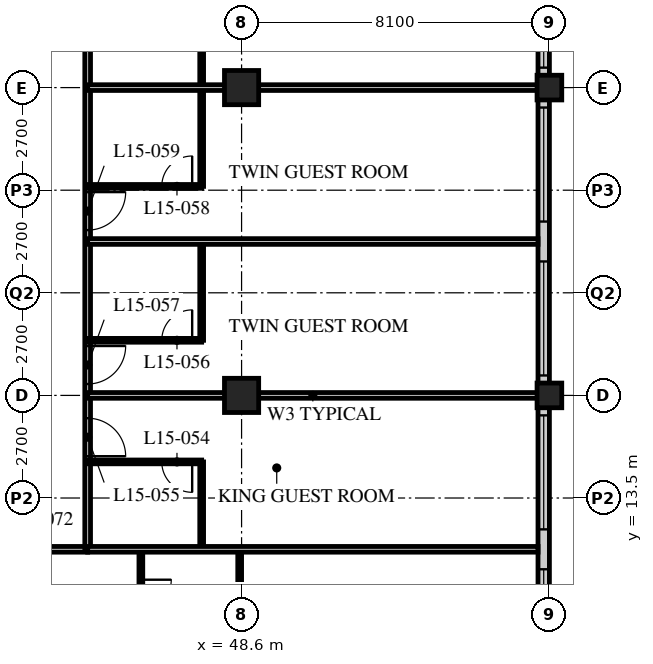
"""IFC4 building model, lengths in metres.
Left out: names, types, materials, properties, quantities, classifications, styles, units other than length and angle.
Written with IfcOpenShell. Run it as: python <this file> out.ifc"""

import sys

from ifc_helpers import new_model, si_unit, direction, frame, frame_2d, origin, origin_2d, place, context, subcontext, project, spatial, rectangle, hollow_rectangle, extrude, element, fill, save


model = new_model("IFC4")
c1 = context("Model", 3, precision=1e-05, world=origin(), true_north=direction((0.0, 1.0)))
c2 = subcontext(c1, "Body", "Model", "MODEL_VIEW")
j1 = project(units=[si_unit("LENGTHUNIT", "METRE"), si_unit("PLANEANGLEUNIT", "RADIAN")], contexts=[c1])
p1 = place(None, origin())
s1 = spatial("IfcSite", under=j1, at=p1, CompositionType="ELEMENT")
p2 = place(p1, origin())
s2 = spatial("IfcBuilding", under=s1, at=p2, CompositionType="ELEMENT")
p3 = place(p2, frame((0.0, 0.0, 63.6)))
s3 = spatial("IfcBuildingStorey", under=s2, at=p3, CompositionType="ELEMENT", Elevation=63.6)
for number, where, z_axis, x_axis in (
    (1, (48.6, 16.2, 0.0), (0.0, 0.0, 1.0), (1.0, 0.0, 0.0)),
    (2, (48.6, 24.3, 0.0), (0.0, 0.0, 1.0), (1.0, 0.0, 0.0)),
):
    element("IfcColumn", number, at=place(p3, frame(where, z_axis=z_axis, x_axis=x_axis)), inside=s3, PredefinedType="COLUMN", context=c2, shape_type="SweptSolid", body=[
        extrude(hollow_rectangle(XDim=0.9, YDim=0.9, WallThickness=0.09, at=origin_2d()), origin(), (0.0, 0.0, 1.0), 3.4),
    ])
for number, where, z_axis, x_axis in (
    (3, (56.7, 16.2, 0.0), (0.0, 0.0, 1.0), (1.0, 0.0, 0.0)),
    (4, (56.7, 24.3, 0.0), (0.0, 0.0, 1.0), (1.0, 0.0, 0.0)),
):
    element("IfcColumn", number, at=place(p3, frame(where, z_axis=z_axis, x_axis=x_axis)), inside=s3, PredefinedType="COLUMN", context=c2, shape_type="SweptSolid", body=[
        extrude(hollow_rectangle(XDim=0.65, YDim=0.65, WallThickness=0.05, at=origin_2d()), origin(), (0.0, 0.0, 1.0), 3.4),
    ])
p4 = place(p3, frame((56.55, 8.4, 0.0), z_axis=(0.0, 0.0, 1.0), x_axis=(0.0, 1.0, 0.0)))
e5 = element("IfcWall", 5, at=p4, inside=s3, PredefinedType="SOLIDWALL", context=c2, shape_type="SweptSolid", body=[
    extrude(rectangle(XDim=32.1, YDim=0.3, at=frame_2d((16.05, 0.0))), origin(), (0.0, 0.0, 1.0), 3.19),
])
p5 = place(p4, frame((0.225, 0.0, 0.9)))
e6 = element("IfcOpeningElement", 6, at=p5, cuts=e5, PredefinedType="OPENING", context=c2, shape_type="SweptSolid", body=[
    extrude(rectangle(XDim=3.0, YDim=2.0, at=frame_2d((1.5, 1.0))), frame((0.0, 0.16, 0.0), z_axis=(0.0, -1.0, 0.0), x_axis=(1.0, 0.0, 0.0)), (0.0, 0.0, 1.0), 0.32),
])
p6 = place(p4, frame((4.275, 0.0, 0.9)))
e7 = element("IfcOpeningElement", 7, at=p6, cuts=e5, PredefinedType="OPENING", context=c2, shape_type="SweptSolid", body=[
    extrude(rectangle(XDim=3.0, YDim=2.0, at=frame_2d((1.5, 1.0))), frame((0.0, 0.16, 0.0), z_axis=(0.0, -1.0, 0.0), x_axis=(1.0, 0.0, 0.0)), (0.0, 0.0, 1.0), 0.32),
])
p7 = place(p4, frame((8.325, 0.0, 0.9)))
e8 = element("IfcOpeningElement", 8, at=p7, cuts=e5, PredefinedType="OPENING", context=c2, shape_type="SweptSolid", body=[
    extrude(rectangle(XDim=3.0, YDim=2.0, at=frame_2d((1.5, 1.0))), frame((0.0, 0.16, 0.0), z_axis=(0.0, -1.0, 0.0), x_axis=(1.0, 0.0, 0.0)), (0.0, 0.0, 1.0), 0.32),
])
p8 = place(p4, frame((12.375, 0.0, 0.9)))
e9 = element("IfcOpeningElement", 9, at=p8, cuts=e5, PredefinedType="OPENING", context=c2, shape_type="SweptSolid", body=[
    extrude(rectangle(XDim=3.0, YDim=2.0, at=frame_2d((1.5, 1.0))), frame((0.0, 0.16, 0.0), z_axis=(0.0, -1.0, 0.0), x_axis=(1.0, 0.0, 0.0)), (0.0, 0.0, 1.0), 0.32),
])
p9 = place(p4, frame((16.425, 0.0, 0.9)))
e10 = element("IfcOpeningElement", 10, at=p9, cuts=e5, PredefinedType="OPENING", context=c2, shape_type="SweptSolid", body=[
    extrude(rectangle(XDim=3.0, YDim=2.0, at=frame_2d((1.5, 1.0))), frame((0.0, 0.16, 0.0), z_axis=(0.0, -1.0, 0.0), x_axis=(1.0, 0.0, 0.0)), (0.0, 0.0, 1.0), 0.32),
])
p10 = place(p4, frame((20.475, 0.0, 0.9)))
e11 = element("IfcOpeningElement", 11, at=p10, cuts=e5, PredefinedType="OPENING", context=c2, shape_type="SweptSolid", body=[
    extrude(rectangle(XDim=3.0, YDim=2.0, at=frame_2d((1.5, 1.0))), frame((0.0, 0.16, 0.0), z_axis=(0.0, -1.0, 0.0), x_axis=(1.0, 0.0, 0.0)), (0.0, 0.0, 1.0), 0.32),
])
p11 = place(p4, frame((24.525, 0.0, 0.9)))
e12 = element("IfcOpeningElement", 12, at=p11, cuts=e5, PredefinedType="OPENING", context=c2, shape_type="SweptSolid", body=[
    extrude(rectangle(XDim=3.0, YDim=2.0, at=frame_2d((1.5, 1.0))), frame((0.0, 0.16, 0.0), z_axis=(0.0, -1.0, 0.0), x_axis=(1.0, 0.0, 0.0)), (0.0, 0.0, 1.0), 0.32),
])
p12 = place(p4, frame((28.575, 0.0, 0.9)))
e13 = element("IfcOpeningElement", 13, at=p12, cuts=e5, PredefinedType="OPENING", context=c2, shape_type="SweptSolid", body=[
    extrude(rectangle(XDim=3.0, YDim=2.0, at=frame_2d((1.5, 1.0))), frame((0.0, 0.16, 0.0), z_axis=(0.0, -1.0, 0.0), x_axis=(1.0, 0.0, 0.0)), (0.0, 0.0, 1.0), 0.32),
])
p13 = place(p3, frame((8.1, 12.15, 0.0), z_axis=(0.0, 0.0, 1.0), x_axis=(1.0, 0.0, 0.0)))
e14 = element("IfcWall", 14, at=p13, inside=s3, PredefinedType="PARTITIONING", context=c2, shape_type="SweptSolid", body=[
    extrude(rectangle(XDim=36.45, YDim=0.15, at=frame_2d((18.225, 0.0))), origin(), (0.0, 0.0, 1.0), 3.19),
])
p14 = place(p13, frame((4.35, 0.0, 0.0)))
e15 = element("IfcOpeningElement", 15, at=p14, cuts=e14, PredefinedType="OPENING", context=c2, shape_type="SweptSolid", body=[
    extrude(rectangle(XDim=1.0, YDim=2.1, at=frame_2d((0.5, 1.05))), frame((0.0, 0.085, 0.0), z_axis=(0.0, -1.0, 0.0), x_axis=(1.0, 0.0, 0.0)), (0.0, 0.0, 1.0), 0.17),
])
p15 = place(p13, frame((10.55, 0.0, 0.0)))
e16 = element("IfcOpeningElement", 16, at=p15, cuts=e14, PredefinedType="OPENING", context=c2, shape_type="SweptSolid", body=[
    extrude(rectangle(XDim=1.0, YDim=2.1, at=frame_2d((0.5, 1.05))), frame((0.0, 0.085, 0.0), z_axis=(0.0, -1.0, 0.0), x_axis=(1.0, 0.0, 0.0)), (0.0, 0.0, 1.0), 0.17),
])
p16 = place(p13, frame((14.6, 0.0, 0.0)))
e17 = element("IfcOpeningElement", 17, at=p16, cuts=e14, PredefinedType="OPENING", context=c2, shape_type="SweptSolid", body=[
    extrude(rectangle(XDim=1.0, YDim=2.1, at=frame_2d((0.5, 1.05))), frame((0.0, 0.085, 0.0), z_axis=(0.0, -1.0, 0.0), x_axis=(1.0, 0.0, 0.0)), (0.0, 0.0, 1.0), 0.17),
])
p17 = place(p13, frame((18.65, 0.0, 0.0)))
e18 = element("IfcOpeningElement", 18, at=p17, cuts=e14, PredefinedType="OPENING", context=c2, shape_type="SweptSolid", body=[
    extrude(rectangle(XDim=1.0, YDim=2.1, at=frame_2d((0.5, 1.05))), frame((0.0, 0.085, 0.0), z_axis=(0.0, -1.0, 0.0), x_axis=(1.0, 0.0, 0.0)), (0.0, 0.0, 1.0), 0.17),
])
p18 = place(p13, frame((22.7, 0.0, 0.0)))
e19 = element("IfcOpeningElement", 19, at=p18, cuts=e14, PredefinedType="OPENING", context=c2, shape_type="SweptSolid", body=[
    extrude(rectangle(XDim=1.0, YDim=2.1, at=frame_2d((0.5, 1.05))), frame((0.0, 0.085, 0.0), z_axis=(0.0, -1.0, 0.0), x_axis=(1.0, 0.0, 0.0)), (0.0, 0.0, 1.0), 0.17),
])
p19 = place(p13, frame((24.6, 0.0, 0.0)))
e20 = element("IfcOpeningElement", 20, at=p19, cuts=e14, PredefinedType="OPENING", context=c2, shape_type="SweptSolid", body=[
    extrude(rectangle(XDim=1.0, YDim=2.1, at=frame_2d((0.5, 1.05))), frame((0.0, 0.085, 0.0), z_axis=(0.0, -1.0, 0.0), x_axis=(1.0, 0.0, 0.0)), (0.0, 0.0, 1.0), 0.17),
])
p20 = place(p13, frame((30.8, 0.0, 0.0)))
e21 = element("IfcOpeningElement", 21, at=p20, cuts=e14, PredefinedType="OPENING", context=c2, shape_type="SweptSolid", body=[
    extrude(rectangle(XDim=1.0, YDim=2.1, at=frame_2d((0.5, 1.05))), frame((0.0, 0.085, 0.0), z_axis=(0.0, -1.0, 0.0), x_axis=(1.0, 0.0, 0.0)), (0.0, 0.0, 1.0), 0.17),
])
p21 = place(p13, frame((1.525, 0.0, 0.0)))
e22 = element("IfcOpeningElement", 22, at=p21, cuts=e14, PredefinedType="OPENING", context=c2, shape_type="SweptSolid", body=[
    extrude(rectangle(XDim=1.0, YDim=2.1, at=frame_2d((0.5, 1.05))), frame((0.0, 0.085, 0.0), z_axis=(0.0, -1.0, 0.0), x_axis=(1.0, 0.0, 0.0)), (0.0, 0.0, 1.0), 0.17),
])
p22 = place(p13, frame((33.925, 0.0, 0.0)))
e23 = element("IfcOpeningElement", 23, at=p22, cuts=e14, PredefinedType="OPENING", context=c2, shape_type="SweptSolid", body=[
    extrude(rectangle(XDim=1.0, YDim=2.1, at=frame_2d((0.5, 1.05))), frame((0.0, 0.085, 0.0), z_axis=(0.0, -1.0, 0.0), x_axis=(1.0, 0.0, 0.0)), (0.0, 0.0, 1.0), 0.17),
])
p23 = place(p3, frame((44.55, 12.15, 0.0), z_axis=(0.0, 0.0, 1.0), x_axis=(0.0, 1.0, 0.0)))
e24 = element("IfcWall", 24, at=p23, inside=s3, PredefinedType="PARTITIONING", context=c2, shape_type="SweptSolid", body=[
    extrude(rectangle(XDim=30.15, YDim=0.15, at=frame_2d((15.075, 0.0))), origin(), (0.0, 0.0, 1.0), 3.19),
])
p24 = place(p23, frame((2.45, 0.0, 0.0)))
e25 = element("IfcOpeningElement", 25, at=p24, cuts=e24, PredefinedType="OPENING", context=c2, shape_type="SweptSolid", body=[
    extrude(rectangle(XDim=1.0, YDim=2.1, at=frame_2d((0.5, 1.05))), frame((0.0, 0.085, 0.0), z_axis=(0.0, -1.0, 0.0), x_axis=(1.0, 0.0, 0.0)), (0.0, 0.0, 1.0), 0.17),
])
p25 = place(p23, frame((4.35, 0.0, 0.0)))
e26 = element("IfcOpeningElement", 26, at=p25, cuts=e24, PredefinedType="OPENING", context=c2, shape_type="SweptSolid", body=[
    extrude(rectangle(XDim=1.0, YDim=2.1, at=frame_2d((0.5, 1.05))), frame((0.0, 0.085, 0.0), z_axis=(0.0, -1.0, 0.0), x_axis=(1.0, 0.0, 0.0)), (0.0, 0.0, 1.0), 0.17),
])
p26 = place(p23, frame((8.4, 0.0, 0.0)))
e27 = element("IfcOpeningElement", 27, at=p26, cuts=e24, PredefinedType="OPENING", context=c2, shape_type="SweptSolid", body=[
    extrude(rectangle(XDim=1.0, YDim=2.1, at=frame_2d((0.5, 1.05))), frame((0.0, 0.085, 0.0), z_axis=(0.0, -1.0, 0.0), x_axis=(1.0, 0.0, 0.0)), (0.0, 0.0, 1.0), 0.17),
])
p27 = place(p23, frame((14.6, 0.0, 0.0)))
e28 = element("IfcOpeningElement", 28, at=p27, cuts=e24, PredefinedType="OPENING", context=c2, shape_type="SweptSolid", body=[
    extrude(rectangle(XDim=1.0, YDim=2.1, at=frame_2d((0.5, 1.05))), frame((0.0, 0.085, 0.0), z_axis=(0.0, -1.0, 0.0), x_axis=(1.0, 0.0, 0.0)), (0.0, 0.0, 1.0), 0.17),
])
p28 = place(p23, frame((21.65, 0.0, 0.0)))
e29 = element("IfcOpeningElement", 29, at=p28, cuts=e24, PredefinedType="OPENING", context=c2, shape_type="SweptSolid", body=[
    extrude(rectangle(XDim=1.0, YDim=2.1, at=frame_2d((0.5, 1.05))), frame((0.0, 0.085, 0.0), z_axis=(0.0, -1.0, 0.0), x_axis=(1.0, 0.0, 0.0)), (0.0, 0.0, 1.0), 0.17),
])
p29 = place(p23, frame((26.7, 0.0, 0.0)))
e30 = element("IfcOpeningElement", 30, at=p29, cuts=e24, PredefinedType="OPENING", context=c2, shape_type="SweptSolid", body=[
    extrude(rectangle(XDim=1.0, YDim=2.1, at=frame_2d((0.5, 1.05))), frame((0.0, 0.085, 0.0), z_axis=(0.0, -1.0, 0.0), x_axis=(1.0, 0.0, 0.0)), (0.0, 0.0, 1.0), 0.17),
])
p30 = place(p3, frame((47.55, 12.15, 0.0), z_axis=(0.0, 0.0, 1.0), x_axis=(0.0, 1.0, 0.0)))
e31 = element("IfcWall", 31, at=p30, inside=s3, PredefinedType="PARTITIONING", context=c2, shape_type="SweptSolid", body=[
    extrude(rectangle(XDim=2.3, YDim=0.1, at=frame_2d((1.15, 0.0))), origin(), (0.0, 0.0, 1.0), 3.19),
])
p31 = place(p3, frame((44.55, 14.45, 0.0), z_axis=(0.0, 0.0, 1.0), x_axis=(1.0, 0.0, 0.0)))
e32 = element("IfcWall", 32, at=p31, inside=s3, PredefinedType="PARTITIONING", context=c2, shape_type="SweptSolid", body=[
    extrude(rectangle(XDim=3.0, YDim=0.1, at=frame_2d((1.5, 0.0))), origin(), (0.0, 0.0, 1.0), 3.19),
])
p32 = place(p31, frame((1.95, 0.0, 0.0)))
e33 = element("IfcOpeningElement", 33, at=p32, cuts=e32, PredefinedType="OPENING", context=c2, shape_type="SweptSolid", body=[
    extrude(rectangle(XDim=0.8, YDim=2.1, at=frame_2d((0.4, 1.05))), frame((0.0, 0.06, 0.0), z_axis=(0.0, -1.0, 0.0), x_axis=(1.0, 0.0, 0.0)), (0.0, 0.0, 1.0), 0.12),
])
p33 = place(p3, frame((44.55, 16.2, 0.0), z_axis=(0.0, 0.0, 1.0), x_axis=(1.0, 0.0, 0.0)))
e34 = element("IfcWall", 34, at=p33, inside=s3, PredefinedType="PARTITIONING", context=c2, shape_type="SweptSolid", body=[
    extrude(rectangle(XDim=11.85, YDim=0.15, at=frame_2d((5.925, 0.0))), origin(), (0.0, 0.0, 1.0), 2.578),
])
p34 = place(p3, frame((47.55, 17.65, 0.0), z_axis=(0.0, 0.0, 1.0), x_axis=(0.0, 1.0, 0.0)))
e35 = element("IfcWall", 35, at=p34, inside=s3, PredefinedType="PARTITIONING", context=c2, shape_type="SweptSolid", body=[
    extrude(rectangle(XDim=2.6, YDim=0.1, at=frame_2d((1.3, 0.0))), origin(), (0.0, 0.0, 1.0), 3.19),
])
p35 = place(p3, frame((44.55, 17.65, 0.0), z_axis=(0.0, 0.0, 1.0), x_axis=(1.0, 0.0, 0.0)))
e36 = element("IfcWall", 36, at=p35, inside=s3, PredefinedType="PARTITIONING", context=c2, shape_type="SweptSolid", body=[
    extrude(rectangle(XDim=3.0, YDim=0.1, at=frame_2d((1.5, 0.0))), origin(), (0.0, 0.0, 1.0), 3.19),
])
p36 = place(p35, frame((1.95, 0.0, 0.0)))
e37 = element("IfcOpeningElement", 37, at=p36, cuts=e36, PredefinedType="OPENING", context=c2, shape_type="SweptSolid", body=[
    extrude(rectangle(XDim=0.8, YDim=2.1, at=frame_2d((0.4, 1.05))), frame((0.0, 0.06, 0.0), z_axis=(0.0, -1.0, 0.0), x_axis=(1.0, 0.0, 0.0)), (0.0, 0.0, 1.0), 0.12),
])
p37 = place(p3, frame((44.55, 20.25, 0.0), z_axis=(0.0, 0.0, 1.0), x_axis=(1.0, 0.0, 0.0)))
e38 = element("IfcWall", 38, at=p37, inside=s3, PredefinedType="PARTITIONING", context=c2, shape_type="SweptSolid", body=[
    extrude(rectangle(XDim=11.85, YDim=0.15, at=frame_2d((5.925, 0.0))), origin(), (0.0, 0.0, 1.0), 3.19),
])
p38 = place(p3, frame((47.55, 21.7, 0.0), z_axis=(0.0, 0.0, 1.0), x_axis=(0.0, 1.0, 0.0)))
e39 = element("IfcWall", 39, at=p38, inside=s3, PredefinedType="PARTITIONING", context=c2, shape_type="SweptSolid", body=[
    extrude(rectangle(XDim=4.9, YDim=0.1, at=frame_2d((2.45, 0.0))), origin(), (0.0, 0.0, 1.0), 3.19),
])
p39 = place(p3, frame((44.55, 21.7, 0.0), z_axis=(0.0, 0.0, 1.0), x_axis=(1.0, 0.0, 0.0)))
e40 = element("IfcWall", 40, at=p39, inside=s3, PredefinedType="PARTITIONING", context=c2, shape_type="SweptSolid", body=[
    extrude(rectangle(XDim=3.0, YDim=0.1, at=frame_2d((1.5, 0.0))), origin(), (0.0, 0.0, 1.0), 3.19),
])
p40 = place(p39, frame((1.95, 0.0, 0.0)))
e41 = element("IfcOpeningElement", 41, at=p40, cuts=e40, PredefinedType="OPENING", context=c2, shape_type="SweptSolid", body=[
    extrude(rectangle(XDim=0.8, YDim=2.1, at=frame_2d((0.4, 1.05))), frame((0.0, 0.06, 0.0), z_axis=(0.0, -1.0, 0.0), x_axis=(1.0, 0.0, 0.0)), (0.0, 0.0, 1.0), 0.12),
])
p41 = place(p3, frame((44.55, 24.3, 0.0), z_axis=(0.0, 0.0, 1.0), x_axis=(1.0, 0.0, 0.0)))
e42 = element("IfcWall", 42, at=p41, inside=s3, PredefinedType="PARTITIONING", context=c2, shape_type="SweptSolid", body=[
    extrude(rectangle(XDim=11.85, YDim=0.15, at=frame_2d((5.925, 0.0))), origin(), (0.0, 0.0, 1.0), 2.578),
])
p42 = place(p3, frame((45.95, 12.15, 0.0), z_axis=(0.0, 0.0, 1.0), x_axis=(0.0, -1.0, 0.0)))
e43 = element("IfcWall", 43, at=p42, inside=s3, PredefinedType="PARTITIONING", context=c2, shape_type="SweptSolid", body=[
    extrude(rectangle(XDim=2.4, YDim=0.1, at=frame_2d((1.2, 0.0))), origin(), (0.0, 0.0, 1.0), 3.19),
])
p43 = place(p42, frame((0.8, 0.0, 0.0)))
e44 = element("IfcOpeningElement", 44, at=p43, cuts=e43, PredefinedType="OPENING", context=c2, shape_type="SweptSolid", body=[
    extrude(rectangle(XDim=0.8, YDim=2.1, at=frame_2d((0.4, 1.05))), frame((0.0, 0.06, 0.0), z_axis=(0.0, -1.0, 0.0), x_axis=(1.0, 0.0, 0.0)), (0.0, 0.0, 1.0), 0.12),
])
p44 = place(p3, frame((48.55, 12.15, 0.0), z_axis=(0.0, 0.0, 1.0), x_axis=(0.0, -1.0, 0.0)))
e45 = element("IfcWall", 45, at=p44, inside=s3, PredefinedType="PARTITIONING", context=c2, shape_type="SweptSolid", body=[
    extrude(rectangle(XDim=2.4, YDim=0.1, at=frame_2d((1.2, 0.0))), origin(), (0.0, 0.0, 1.0), 2.578),
])
p45 = place(p3, frame((44.55, 12.15, 0.0), z_axis=(0.0, 0.0, 1.0), x_axis=(1.0, 0.0, 0.0)))
e46 = element("IfcWall", 46, at=p45, inside=s3, PredefinedType="PARTITIONING", context=c2, shape_type="SweptSolid", body=[
    extrude(rectangle(XDim=11.85, YDim=0.15, at=frame_2d((5.925, 0.0))), origin(), (0.0, 0.0, 1.0), 3.19),
])
p46 = place(p5, origin())
e47 = element("IfcWindow", 47, at=p46, inside=s3, PartitioningType="SINGLE_PANEL", PredefinedType="WINDOW", context=c2, shape_type="SweptSolid", body=[
    extrude(rectangle(XDim=3.0, YDim=2.0, at=frame_2d((1.5, 1.0))), frame((0.0, 0.03, 0.0), z_axis=(0.0, -1.0, 0.0), x_axis=(1.0, 0.0, 0.0)), (0.0, 0.0, 1.0), 0.06),
])
fill(e6, e47)
p47 = place(p6, origin())
e48 = element("IfcWindow", 48, at=p47, inside=s3, PartitioningType="SINGLE_PANEL", PredefinedType="WINDOW", context=c2, shape_type="SweptSolid", body=[
    extrude(rectangle(XDim=3.0, YDim=2.0, at=frame_2d((1.5, 1.0))), frame((0.0, 0.03, 0.0), z_axis=(0.0, -1.0, 0.0), x_axis=(1.0, 0.0, 0.0)), (0.0, 0.0, 1.0), 0.06),
])
fill(e7, e48)
p48 = place(p7, origin())
e49 = element("IfcWindow", 49, at=p48, inside=s3, PartitioningType="SINGLE_PANEL", PredefinedType="WINDOW", context=c2, shape_type="SweptSolid", body=[
    extrude(rectangle(XDim=3.0, YDim=2.0, at=frame_2d((1.5, 1.0))), frame((0.0, 0.03, 0.0), z_axis=(0.0, -1.0, 0.0), x_axis=(1.0, 0.0, 0.0)), (0.0, 0.0, 1.0), 0.06),
])
fill(e8, e49)
p49 = place(p8, origin())
e50 = element("IfcWindow", 50, at=p49, inside=s3, PartitioningType="SINGLE_PANEL", PredefinedType="WINDOW", context=c2, shape_type="SweptSolid", body=[
    extrude(rectangle(XDim=3.0, YDim=2.0, at=frame_2d((1.5, 1.0))), frame((0.0, 0.03, 0.0), z_axis=(0.0, -1.0, 0.0), x_axis=(1.0, 0.0, 0.0)), (0.0, 0.0, 1.0), 0.06),
])
fill(e9, e50)
p50 = place(p9, origin())
e51 = element("IfcWindow", 51, at=p50, inside=s3, PartitioningType="SINGLE_PANEL", PredefinedType="WINDOW", context=c2, shape_type="SweptSolid", body=[
    extrude(rectangle(XDim=3.0, YDim=2.0, at=frame_2d((1.5, 1.0))), frame((0.0, 0.03, 0.0), z_axis=(0.0, -1.0, 0.0), x_axis=(1.0, 0.0, 0.0)), (0.0, 0.0, 1.0), 0.06),
])
fill(e10, e51)
p51 = place(p32, origin())
e52 = element("IfcDoor", 52, at=p51, inside=s3, OperationType="SINGLE_SWING_LEFT", PredefinedType="DOOR", context=c2, shape_type="SweptSolid", body=[
    extrude(rectangle(XDim=0.8, YDim=2.1, at=frame_2d((0.4, 1.05))), frame((0.0, 0.025, 0.0), z_axis=(0.0, -1.0, 0.0), x_axis=(1.0, 0.0, 0.0)), (0.0, 0.0, 1.0), 0.05),
])
fill(e33, e52)
p52 = place(p24, origin())
e53 = element("IfcDoor", 53, at=p52, inside=s3, OperationType="SINGLE_SWING_RIGHT", PredefinedType="DOOR", context=c2, shape_type="SweptSolid", body=[
    extrude(rectangle(XDim=1.0, YDim=2.1, at=frame_2d((0.5, 1.05))), frame((0.0, 0.025, 0.0), z_axis=(0.0, -1.0, 0.0), x_axis=(1.0, 0.0, 0.0)), (0.0, 0.0, 1.0), 0.05),
])
fill(e25, e53)
p53 = place(p36, origin())
e54 = element("IfcDoor", 54, at=p53, inside=s3, OperationType="SINGLE_SWING_RIGHT", PredefinedType="DOOR", context=c2, shape_type="SweptSolid", body=[
    extrude(rectangle(XDim=0.8, YDim=2.1, at=frame_2d((0.4, 1.05))), frame((0.0, 0.025, 0.0), z_axis=(0.0, -1.0, 0.0), x_axis=(1.0, 0.0, 0.0)), (0.0, 0.0, 1.0), 0.05),
])
fill(e37, e54)
p54 = place(p25, origin())
e55 = element("IfcDoor", 55, at=p54, inside=s3, OperationType="SINGLE_SWING_LEFT", PredefinedType="DOOR", context=c2, shape_type="SweptSolid", body=[
    extrude(rectangle(XDim=1.0, YDim=2.1, at=frame_2d((0.5, 1.05))), frame((0.0, 0.025, 0.0), z_axis=(0.0, -1.0, 0.0), x_axis=(1.0, 0.0, 0.0)), (0.0, 0.0, 1.0), 0.05),
])
fill(e26, e55)
p55 = place(p40, origin())
e56 = element("IfcDoor", 56, at=p55, inside=s3, OperationType="SINGLE_SWING_RIGHT", PredefinedType="DOOR", context=c2, shape_type="SweptSolid", body=[
    extrude(rectangle(XDim=0.8, YDim=2.1, at=frame_2d((0.4, 1.05))), frame((0.0, 0.025, 0.0), z_axis=(0.0, -1.0, 0.0), x_axis=(1.0, 0.0, 0.0)), (0.0, 0.0, 1.0), 0.05),
])
fill(e41, e56)
p56 = place(p26, origin())
e57 = element("IfcDoor", 57, at=p56, inside=s3, OperationType="SINGLE_SWING_LEFT", PredefinedType="DOOR", context=c2, shape_type="SweptSolid", body=[
    extrude(rectangle(XDim=1.0, YDim=2.1, at=frame_2d((0.5, 1.05))), frame((0.0, 0.025, 0.0), z_axis=(0.0, -1.0, 0.0), x_axis=(1.0, 0.0, 0.0)), (0.0, 0.0, 1.0), 0.05),
])
fill(e27, e57)
p57 = place(p43, origin())
e58 = element("IfcDoor", 58, at=p57, inside=s3, OperationType="SINGLE_SWING_LEFT", PredefinedType="DOOR", context=c2, shape_type="SweptSolid", body=[
    extrude(rectangle(XDim=0.8, YDim=2.1, at=frame_2d((0.4, 1.05))), frame((0.0, 0.025, 0.0), z_axis=(0.0, -1.0, 0.0), x_axis=(1.0, 0.0, 0.0)), (0.0, 0.0, 1.0), 0.05),
])
fill(e44, e58)
save(model, sys.argv[1])
